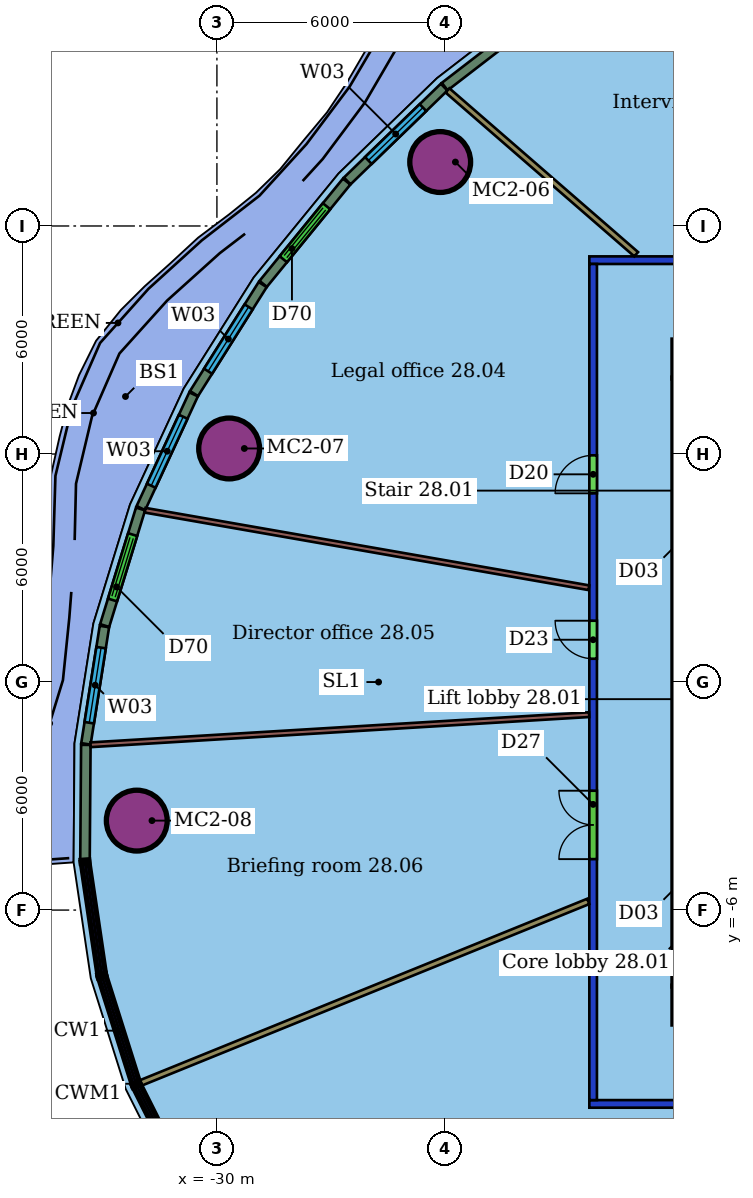
"""IFC4 building model, lengths in metres.
Left out: names, types, materials, properties, quantities, classifications, styles, units other than length and angle.
Written with IfcOpenShell. Run it as: python <this file> out.ifc"""

import sys

from ifc_helpers import new_model, si_unit, direction, frame, frame_2d, origin, origin_2d, place, context, subcontext, project, spatial, rectangle, hollow_circle, extrude, element, fill, save


model = new_model("IFC4")
c1 = context("Model", 3, precision=1e-05, world=origin(), true_north=direction((0.0, 1.0)))
c2 = subcontext(c1, "Body", "Model", "MODEL_VIEW")
j1 = project(units=[si_unit("LENGTHUNIT", "METRE"), si_unit("PLANEANGLEUNIT", "RADIAN")], contexts=[c1])
p1 = place(None, origin())
s1 = spatial("IfcSite", under=j1, at=p1, CompositionType="ELEMENT")
p2 = place(p1, origin())
s2 = spatial("IfcBuilding", under=s1, at=p2, CompositionType="ELEMENT")
p3 = place(p2, frame((0.0, 0.0, 121.0)))
s3 = spatial("IfcBuildingStorey", under=s2, at=p3, CompositionType="ELEMENT", Elevation=121.0)
for number, where, z_axis, x_axis in (
    (1, (-24.125, 13.683, 0.0), (0.0, 0.0, 1.0), (1.0, 0.0, 0.0)),
    (2, (-29.679, 6.146, 0.0), (0.0, 0.0, 1.0), (1.0, 0.0, 0.0)),
    (3, (-32.109, -3.646, 0.0), (0.0, 0.0, 1.0), (1.0, 0.0, 0.0)),
):
    element("IfcColumn", number, at=place(p3, frame(where, z_axis=z_axis, x_axis=x_axis)), inside=s3, PredefinedType="COLUMN", context=c2, shape_type="SweptSolid", body=[
        extrude(hollow_circle(Radius=0.8, WallThickness=0.055, at=origin_2d()), origin(), (0.0, 0.0, 1.0), 3.45),
    ])
p4 = place(p3, frame((8.2, -11.1, 0.0), z_axis=(0.0, 0.0, 1.0), x_axis=(-1.0, 0.0, 0.0)))
e4 = element("IfcWall", 4, at=p4, inside=s3, PredefinedType="PARTITIONING", context=c2, shape_type="SweptSolid", body=[
    extrude(rectangle(XDim=28.4, YDim=0.2, at=frame_2d((14.2, 0.0))), origin(), (0.0, 0.0, 1.0), 3.0),
])
p5 = place(p4, frame((22.666, 0.0, 0.0)))
e5 = element("IfcOpeningElement", 5, at=p5, cuts=e4, PredefinedType="OPENING", context=c2, shape_type="SweptSolid", body=[
    extrude(rectangle(XDim=0.9, YDim=2.1, at=frame_2d((0.45, 1.05))), frame((0.0, 0.11, 0.0), z_axis=(0.0, -1.0, 0.0), x_axis=(1.0, 0.0, 0.0)), (0.0, 0.0, 1.0), 0.22),
])
p6 = place(p4, frame((17.362, 0.0, 0.0)))
e6 = element("IfcOpeningElement", 6, at=p6, cuts=e4, PredefinedType="OPENING", context=c2, shape_type="SweptSolid", body=[
    extrude(rectangle(XDim=1.8, YDim=2.4, at=frame_2d((0.9, 1.2))), frame((0.0, 0.11, 0.0), z_axis=(0.0, -1.0, 0.0), x_axis=(1.0, 0.0, 0.0)), (0.0, 0.0, 1.0), 0.22),
])
p7 = place(p4, frame((12.592, 0.0, 0.0)))
e7 = element("IfcOpeningElement", 7, at=p7, cuts=e4, PredefinedType="OPENING", context=c2, shape_type="SweptSolid", body=[
    extrude(rectangle(XDim=0.9, YDim=2.1, at=frame_2d((0.45, 1.05))), frame((0.0, 0.11, 0.0), z_axis=(0.0, -1.0, 0.0), x_axis=(1.0, 0.0, 0.0)), (0.0, 0.0, 1.0), 0.22),
])
p8 = place(p4, frame((6.504, 0.0, 0.0)))
e8 = element("IfcOpeningElement", 8, at=p8, cuts=e4, PredefinedType="OPENING", context=c2, shape_type="SweptSolid", body=[
    extrude(rectangle(XDim=1.5, YDim=2.1, at=frame_2d((0.75, 1.05))), frame((0.0, 0.11, 0.0), z_axis=(0.0, -1.0, 0.0), x_axis=(1.0, 0.0, 0.0)), (0.0, 0.0, 1.0), 0.22),
])
p9 = place(p4, frame((2.423, 0.0, 0.0)))
e9 = element("IfcOpeningElement", 9, at=p9, cuts=e4, PredefinedType="OPENING", context=c2, shape_type="SweptSolid", body=[
    extrude(rectangle(XDim=1.0, YDim=2.1, at=frame_2d((0.5, 1.05))), frame((0.0, 0.11, 0.0), z_axis=(0.0, -1.0, 0.0), x_axis=(1.0, 0.0, 0.0)), (0.0, 0.0, 1.0), 0.22),
])
p10 = place(p3, frame((-20.1, -11.0, 0.0), z_axis=(0.0, 0.0, 1.0), x_axis=(0.0, 1.0, 0.0)))
e10 = element("IfcWall", 10, at=p10, inside=s3, PredefinedType="PARTITIONING", context=c2, shape_type="SweptSolid", body=[
    extrude(rectangle(XDim=22.0, YDim=0.2, at=frame_2d((11.0, 0.0))), origin(), (0.0, 0.0, 1.0), 3.0),
])
p11 = place(p10, frame((15.966, 0.0, 0.0)))
e11 = element("IfcOpeningElement", 11, at=p11, cuts=e10, PredefinedType="OPENING", context=c2, shape_type="SweptSolid", body=[
    extrude(rectangle(XDim=1.0, YDim=2.1, at=frame_2d((0.5, 1.05))), frame((0.0, 0.11, 0.0), z_axis=(0.0, -1.0, 0.0), x_axis=(1.0, 0.0, 0.0)), (0.0, 0.0, 1.0), 0.22),
])
p12 = place(p10, frame((11.613, 0.0, 0.0)))
e12 = element("IfcOpeningElement", 12, at=p12, cuts=e10, PredefinedType="OPENING", context=c2, shape_type="SweptSolid", body=[
    extrude(rectangle(XDim=1.0, YDim=2.4, at=frame_2d((0.5, 1.2))), frame((0.0, 0.11, 0.0), z_axis=(0.0, -1.0, 0.0), x_axis=(1.0, 0.0, 0.0)), (0.0, 0.0, 1.0), 0.22),
])
p13 = place(p10, frame((6.341, 0.0, 0.0)))
e13 = element("IfcOpeningElement", 13, at=p13, cuts=e10, PredefinedType="OPENING", context=c2, shape_type="SweptSolid", body=[
    extrude(rectangle(XDim=1.8, YDim=2.4, at=frame_2d((0.9, 1.2))), frame((0.0, 0.11, 0.0), z_axis=(0.0, -1.0, 0.0), x_axis=(1.0, 0.0, 0.0)), (0.0, 0.0, 1.0), 0.22),
])
p14 = place(p3, frame((-20.2, 11.1, 0.0), z_axis=(0.0, 0.0, 1.0), x_axis=(1.0, 0.0, 0.0)))
e14 = element("IfcWall", 14, at=p14, inside=s3, PredefinedType="PARTITIONING", context=c2, shape_type="SweptSolid", body=[
    extrude(rectangle(XDim=28.4, YDim=0.2, at=frame_2d((14.2, 0.0))), origin(), (0.0, 0.0, 1.0), 3.0),
])
p15 = place(p14, frame((17.572, 0.0, 0.0)))
e15 = element("IfcOpeningElement", 15, at=p15, cuts=e14, PredefinedType="OPENING", context=c2, shape_type="SweptSolid", body=[
    extrude(rectangle(XDim=1.5, YDim=2.1, at=frame_2d((0.75, 1.05))), frame((0.0, 0.11, 0.0), z_axis=(0.0, -1.0, 0.0), x_axis=(1.0, 0.0, 0.0)), (0.0, 0.0, 1.0), 0.22),
])
p16 = place(p14, frame((11.177, 0.0, 0.0)))
e16 = element("IfcOpeningElement", 16, at=p16, cuts=e14, PredefinedType="OPENING", context=c2, shape_type="SweptSolid", body=[
    extrude(rectangle(XDim=1.0, YDim=2.1, at=frame_2d((0.5, 1.05))), frame((0.0, 0.11, 0.0), z_axis=(0.0, -1.0, 0.0), x_axis=(1.0, 0.0, 0.0)), (0.0, 0.0, 1.0), 0.22),
])
p17 = place(p14, frame((6.349, 0.0, 0.0)))
e17 = element("IfcOpeningElement", 17, at=p17, cuts=e14, PredefinedType="OPENING", context=c2, shape_type="SweptSolid", body=[
    extrude(rectangle(XDim=0.9, YDim=2.1, at=frame_2d((0.45, 1.05))), frame((0.0, 0.11, 0.0), z_axis=(0.0, -1.0, 0.0), x_axis=(1.0, 0.0, 0.0)), (0.0, 0.0, 1.0), 0.22),
])
p18 = place(p14, frame((22.396, 0.0, 0.0)))
e18 = element("IfcOpeningElement", 18, at=p18, cuts=e14, PredefinedType="OPENING", context=c2, shape_type="SweptSolid", body=[
    extrude(rectangle(XDim=1.8, YDim=2.1, at=frame_2d((0.9, 1.05))), frame((0.0, 0.11, 0.0), z_axis=(0.0, -1.0, 0.0), x_axis=(1.0, 0.0, 0.0)), (0.0, 0.0, 1.0), 0.22),
])
p19 = place(p3, frame((-23.932, 15.566, 0.0), z_axis=(0.0, 0.0, 1.0), x_axis=(0.755165660984, -0.655533999477, 0.0)))
e19 = element("IfcWall", 19, at=p19, inside=s3, PredefinedType="PARTITIONING", context=c2, shape_type="SweptSolid", body=[
    extrude(rectangle(XDim=6.574, YDim=0.15, at=frame_2d((3.287, 0.0))), origin(), (0.0, 0.0, 1.0), 3.45),
])
p20 = place(p3, frame((-31.889, 4.521, 0.0), z_axis=(0.0, 0.0, 1.0), x_axis=(0.985094389191, -0.172014663285, 0.0)))
e20 = element("IfcWall", 20, at=p20, inside=s3, PredefinedType="PARTITIONING", context=c2, shape_type="SweptSolid", body=[
    extrude(rectangle(XDim=11.855, YDim=0.125, at=frame_2d((5.928, 0.0))), origin(), (0.0, 0.0, 1.0), 3.45),
])
p21 = place(p3, frame((-33.324, -1.65, 0.0), z_axis=(0.0, 0.0, 1.0), x_axis=(0.998180914555, 0.060289815203, 0.0)))
e21 = element("IfcWall", 21, at=p21, inside=s3, PredefinedType="PARTITIONING", context=c2, shape_type="SweptSolid", body=[
    extrude(rectangle(XDim=13.145, YDim=0.125, at=frame_2d((6.572, 0.0))), origin(), (0.0, 0.0, 1.0), 3.45),
])
p22 = place(p3, frame((-32.006, -10.549, 0.0), z_axis=(0.0, 0.0, 1.0), x_axis=(0.926664050795, 0.375890591749, 0.0)))
e22 = element("IfcWall", 22, at=p22, inside=s3, PredefinedType="PARTITIONING", context=c2, shape_type="SweptSolid", body=[
    extrude(rectangle(XDim=12.709, YDim=0.15, at=frame_2d((6.355, 0.0))), origin(), (0.0, 0.0, 1.0), 3.45),
])
p23 = place(p3, frame((-18.336, -22.463, 0.0), z_axis=(0.0, 0.0, 1.0), x_axis=(0.481358172348, 0.876523992777, 0.0)))
e23 = element("IfcWall", 23, at=p23, inside=s3, PredefinedType="PARTITIONING", context=c2, shape_type="SweptSolid", body=[
    extrude(rectangle(XDim=12.809, YDim=0.15, at=frame_2d((6.404, 0.0))), origin(), (0.0, 0.0, 1.0), 3.45),
])
p24 = place(p3, frame((-21.183, 17.843, 0.0), z_axis=(0.0, 0.0, 1.0), x_axis=(-0.792037804, -0.610472044433, 0.0)))
e24 = element("IfcWall", 24, at=p24, inside=s3, PredefinedType="SOLIDWALL", context=c2, shape_type="SweptSolid", body=[
    extrude(rectangle(XDim=3.563, YDim=0.25, at=frame_2d((1.782, 0.0))), origin(), (0.0, 0.0, 1.0), 3.05),
])
p25 = place(p3, frame((-24.022, 15.653, 0.0), z_axis=(0.0, 0.0, 1.0), x_axis=(-0.718334776763, -0.695697598453, 0.0)))
e25 = element("IfcWall", 25, at=p25, inside=s3, PredefinedType="SOLIDWALL", context=c2, shape_type="SweptSolid", body=[
    extrude(rectangle(XDim=3.548, YDim=0.25, at=frame_2d((1.774, 0.0))), origin(), (0.0, 0.0, 1.0), 3.05),
])
p26 = place(p25, frame((0.774, 0.0, 0.9)))
e26 = element("IfcOpeningElement", 26, at=p26, cuts=e25, PredefinedType="OPENING", context=c2, shape_type="SweptSolid", body=[
    extrude(rectangle(XDim=2.0, YDim=2.1, at=frame_2d((1.0, 1.05))), frame((0.0, 0.135, 0.0), z_axis=(0.0, -1.0, 0.0), x_axis=(1.0, 0.0, 0.0)), (0.0, 0.0, 1.0), 0.27),
])
p27 = place(p3, frame((-26.586, 13.168, 0.0), z_axis=(0.0, 0.0, 1.0), x_axis=(-0.632318819386, -0.774708274546, 0.0)))
e27 = element("IfcWall", 27, at=p27, inside=s3, PredefinedType="SOLIDWALL", context=c2, shape_type="SweptSolid", body=[
    extrude(rectangle(XDim=3.474, YDim=0.25, at=frame_2d((1.737, 0.0))), origin(), (0.0, 0.0, 1.0), 3.05),
])
p28 = place(p27, frame((0.837, 0.0, 0.0)))
e28 = element("IfcOpeningElement", 28, at=p28, cuts=e27, PredefinedType="OPENING", context=c2, shape_type="SweptSolid", body=[
    extrude(rectangle(XDim=1.8, YDim=2.4, at=frame_2d((0.9, 1.2))), frame((0.0, 0.135, 0.0), z_axis=(0.0, -1.0, 0.0), x_axis=(1.0, 0.0, 0.0)), (0.0, 0.0, 1.0), 0.27),
])
p29 = place(p3, frame((-28.796, 10.458, 0.0), z_axis=(0.0, 0.0, 1.0), x_axis=(-0.533187726109, -0.845996955506, 0.0)))
e29 = element("IfcWall", 29, at=p29, inside=s3, PredefinedType="SOLIDWALL", context=c2, shape_type="SweptSolid", body=[
    extrude(rectangle(XDim=3.389, YDim=0.25, at=frame_2d((1.694, 0.0))), origin(), (0.0, 0.0, 1.0), 3.05),
])
p30 = place(p29, frame((0.695, 0.0, 0.9)))
e30 = element("IfcOpeningElement", 30, at=p30, cuts=e29, PredefinedType="OPENING", context=c2, shape_type="SweptSolid", body=[
    extrude(rectangle(XDim=2.0, YDim=2.1, at=frame_2d((1.0, 1.05))), frame((0.0, 0.135, 0.0), z_axis=(0.0, -1.0, 0.0), x_axis=(1.0, 0.0, 0.0)), (0.0, 0.0, 1.0), 0.27),
])
p31 = place(p3, frame((-30.614, 7.57, 0.0), z_axis=(0.0, 0.0, 1.0), x_axis=(-0.420461012784, -0.907310606534, 0.0)))
e31 = element("IfcWall", 31, at=p31, inside=s3, PredefinedType="SOLIDWALL", context=c2, shape_type="SweptSolid", body=[
    extrude(rectangle(XDim=3.299, YDim=0.25, at=frame_2d((1.649, 0.0))), origin(), (0.0, 0.0, 1.0), 3.05),
])
p32 = place(p31, frame((0.649, 0.0, 0.9)))
e32 = element("IfcOpeningElement", 32, at=p32, cuts=e31, PredefinedType="OPENING", context=c2, shape_type="SweptSolid", body=[
    extrude(rectangle(XDim=2.0, YDim=2.1, at=frame_2d((1.0, 1.05))), frame((0.0, 0.135, 0.0), z_axis=(0.0, -1.0, 0.0), x_axis=(1.0, 0.0, 0.0)), (0.0, 0.0, 1.0), 0.27),
])
p33 = place(p3, frame((-32.01, 4.554, 0.0), z_axis=(0.0, 0.0, 1.0), x_axis=(-0.294326394651, -0.955704961488, 0.0)))
e33 = element("IfcWall", 33, at=p33, inside=s3, PredefinedType="SOLIDWALL", context=c2, shape_type="SweptSolid", body=[
    extrude(rectangle(XDim=3.209, YDim=0.25, at=frame_2d((1.604, 0.0))), origin(), (0.0, 0.0, 1.0), 3.05),
])
p34 = place(p33, frame((0.705, 0.0, 0.0)))
e34 = element("IfcOpeningElement", 34, at=p34, cuts=e33, PredefinedType="OPENING", context=c2, shape_type="SweptSolid", body=[
    extrude(rectangle(XDim=1.8, YDim=2.4, at=frame_2d((0.9, 1.2))), frame((0.0, 0.135, 0.0), z_axis=(0.0, -1.0, 0.0), x_axis=(1.0, 0.0, 0.0)), (0.0, 0.0, 1.0), 0.27),
])
p35 = place(p3, frame((-32.96, 1.461, 0.0), z_axis=(0.0, 0.0, 1.0), x_axis=(-0.155782128251, -0.987791439788, 0.0)))
e35 = element("IfcWall", 35, at=p35, inside=s3, PredefinedType="SOLIDWALL", context=c2, shape_type="SweptSolid", body=[
    extrude(rectangle(XDim=3.126, YDim=0.25, at=frame_2d((1.563, 0.0))), origin(), (0.0, 0.0, 1.0), 3.05),
])
p36 = place(p35, frame((0.563, 0.0, 0.9)))
e36 = element("IfcOpeningElement", 36, at=p36, cuts=e35, PredefinedType="OPENING", context=c2, shape_type="SweptSolid", body=[
    extrude(rectangle(XDim=2.0, YDim=2.1, at=frame_2d((1.0, 1.05))), frame((0.0, 0.135, 0.0), z_axis=(0.0, -1.0, 0.0), x_axis=(1.0, 0.0, 0.0)), (0.0, 0.0, 1.0), 0.27),
])
p37 = place(p3, frame((-33.449, -1.653, 0.0), z_axis=(0.0, 0.0, 1.0), x_axis=(-0.007366431712, -0.999972867474, 0.0)))
e37 = element("IfcWall", 37, at=p37, inside=s3, PredefinedType="SOLIDWALL", context=c2, shape_type="SweptSolid", body=[
    extrude(rectangle(XDim=3.016, YDim=0.25, at=frame_2d((1.508, 0.0))), origin(), (0.0, 0.0, 1.0), 3.05),
])
p38 = place(p11, origin())
e38 = element("IfcDoor", 38, at=p38, inside=s3, OperationType="SINGLE_SWING_LEFT", PredefinedType="DOOR", context=c2, shape_type="SweptSolid", body=[
    extrude(rectangle(XDim=1.0, YDim=2.1, at=frame_2d((0.5, 1.05))), frame((0.0, 0.025, 0.0), z_axis=(0.0, -1.0, 0.0), x_axis=(1.0, 0.0, 0.0)), (0.0, 0.0, 1.0), 0.05),
])
fill(e11, e38)
p39 = place(p12, origin())
e39 = element("IfcDoor", 39, at=p39, inside=s3, OperationType="SINGLE_SWING_RIGHT", PredefinedType="DOOR", context=c2, shape_type="SweptSolid", body=[
    extrude(rectangle(XDim=1.0, YDim=2.4, at=frame_2d((0.5, 1.2))), frame((0.0, 0.025, 0.0), z_axis=(0.0, -1.0, 0.0), x_axis=(1.0, 0.0, 0.0)), (0.0, 0.0, 1.0), 0.05),
])
fill(e12, e39)
p40 = place(p13, origin())
e40 = element("IfcDoor", 40, at=p40, inside=s3, OperationType="DOUBLE_DOOR_SINGLE_SWING", PredefinedType="DOOR", context=c2, shape_type="SweptSolid", body=[
    extrude(rectangle(XDim=1.8, YDim=2.4, at=frame_2d((0.9, 1.2))), frame((0.0, 0.025, 0.0), z_axis=(0.0, -1.0, 0.0), x_axis=(1.0, 0.0, 0.0)), (0.0, 0.0, 1.0), 0.05),
])
fill(e13, e40)
p41 = place(p26, origin())
e41 = element("IfcWindow", 41, at=p41, inside=s3, PartitioningType="SINGLE_PANEL", PredefinedType="WINDOW", context=c2, shape_type="SweptSolid", body=[
    extrude(rectangle(XDim=2.0, YDim=2.1, at=frame_2d((1.0, 1.05))), frame((0.0, 0.03, 0.0), z_axis=(0.0, -1.0, 0.0), x_axis=(1.0, 0.0, 0.0)), (0.0, 0.0, 1.0), 0.06),
])
fill(e26, e41)
p42 = place(p28, origin())
e42 = element("IfcDoor", 42, at=p42, inside=s3, OperationType="DOUBLE_DOOR_SLIDING", PredefinedType="DOOR", context=c2, shape_type="SweptSolid", body=[
    extrude(rectangle(XDim=1.8, YDim=2.4, at=frame_2d((0.9, 1.2))), frame((0.0, 0.025, 0.0), z_axis=(0.0, -1.0, 0.0), x_axis=(1.0, 0.0, 0.0)), (0.0, 0.0, 1.0), 0.05),
])
fill(e28, e42)
p43 = place(p30, origin())
e43 = element("IfcWindow", 43, at=p43, inside=s3, PartitioningType="SINGLE_PANEL", PredefinedType="WINDOW", context=c2, shape_type="SweptSolid", body=[
    extrude(rectangle(XDim=2.0, YDim=2.1, at=frame_2d((1.0, 1.05))), frame((0.0, 0.03, 0.0), z_axis=(0.0, -1.0, 0.0), x_axis=(1.0, 0.0, 0.0)), (0.0, 0.0, 1.0), 0.06),
])
fill(e30, e43)
p44 = place(p32, origin())
e44 = element("IfcWindow", 44, at=p44, inside=s3, PartitioningType="SINGLE_PANEL", PredefinedType="WINDOW", context=c2, shape_type="SweptSolid", body=[
    extrude(rectangle(XDim=2.0, YDim=2.1, at=frame_2d((1.0, 1.05))), frame((0.0, 0.03, 0.0), z_axis=(0.0, -1.0, 0.0), x_axis=(1.0, 0.0, 0.0)), (0.0, 0.0, 1.0), 0.06),
])
fill(e32, e44)
p45 = place(p34, origin())
e45 = element("IfcDoor", 45, at=p45, inside=s3, OperationType="DOUBLE_DOOR_SLIDING", PredefinedType="DOOR", context=c2, shape_type="SweptSolid", body=[
    extrude(rectangle(XDim=1.8, YDim=2.4, at=frame_2d((0.9, 1.2))), frame((0.0, 0.025, 0.0), z_axis=(0.0, -1.0, 0.0), x_axis=(1.0, 0.0, 0.0)), (0.0, 0.0, 1.0), 0.05),
])
fill(e34, e45)
p46 = place(p36, origin())
e46 = element("IfcWindow", 46, at=p46, inside=s3, PartitioningType="SINGLE_PANEL", PredefinedType="WINDOW", context=c2, shape_type="SweptSolid", body=[
    extrude(rectangle(XDim=2.0, YDim=2.1, at=frame_2d((1.0, 1.05))), frame((0.0, 0.03, 0.0), z_axis=(0.0, -1.0, 0.0), x_axis=(1.0, 0.0, 0.0)), (0.0, 0.0, 1.0), 0.06),
])
fill(e36, e46)
save(model, sys.argv[1])
